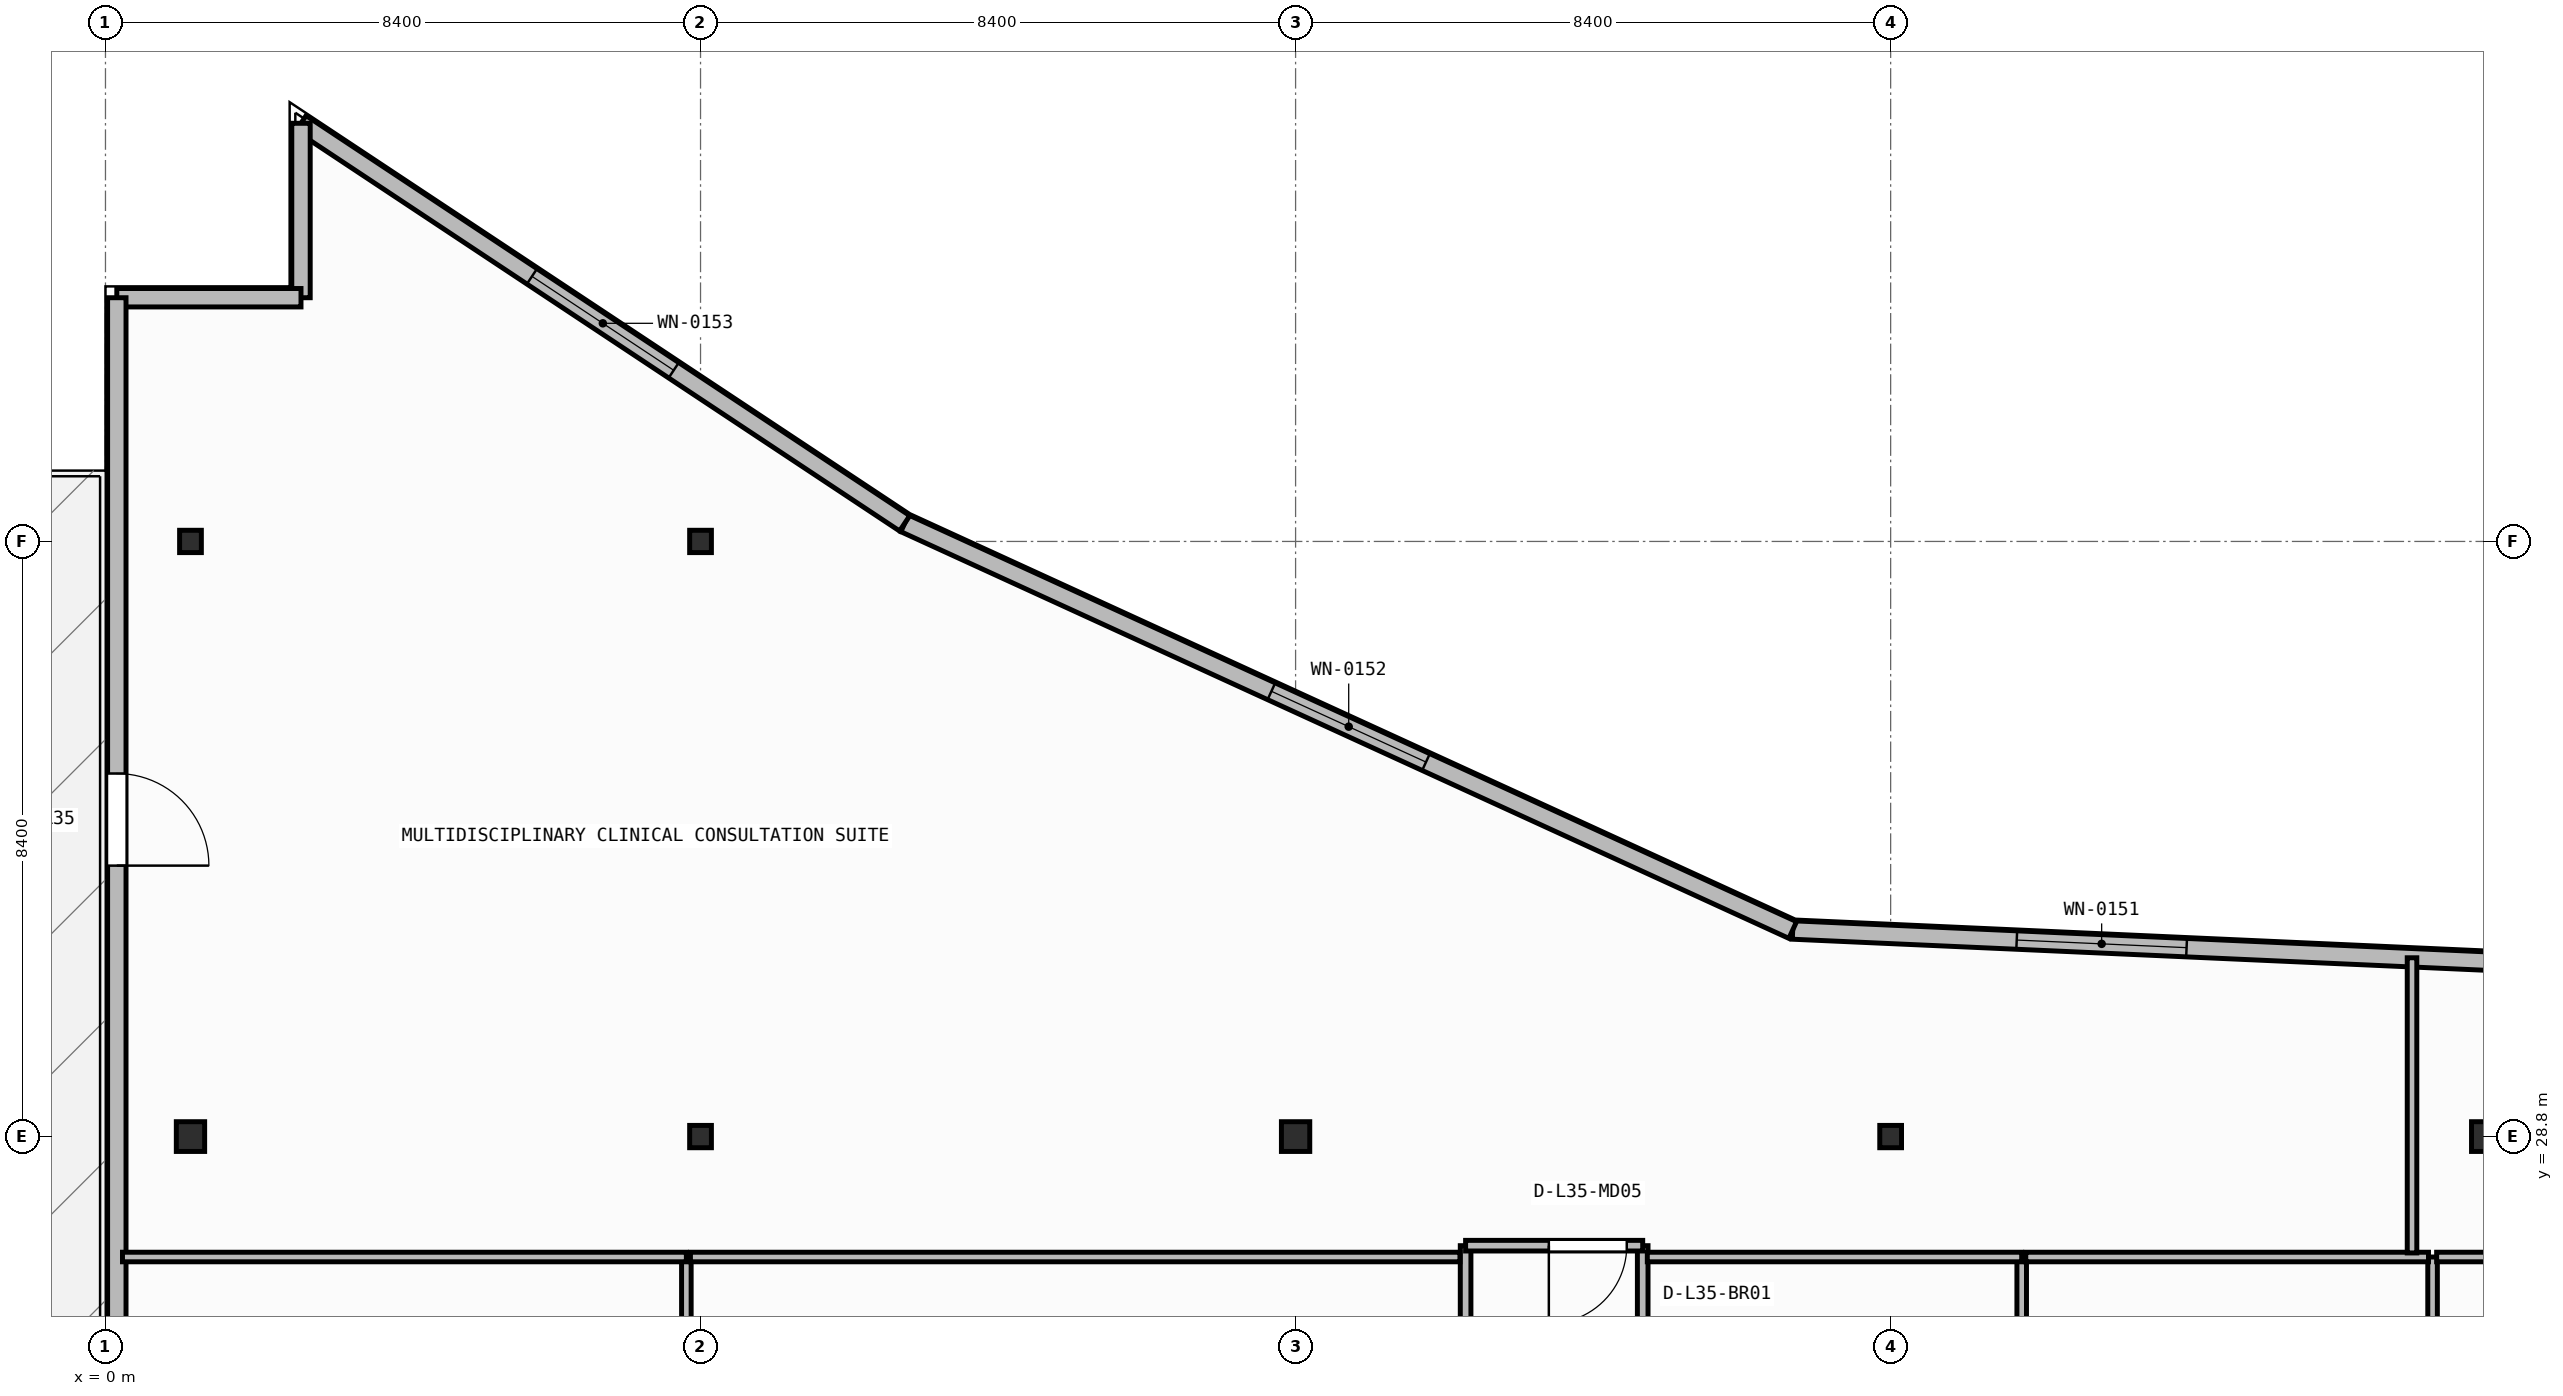
"""IFC4 building model, lengths in metres.
Left out: names, types, materials, properties, quantities, classifications, styles, units other than length and angle.
Written with IfcOpenShell. Run it as: python <this file> out.ifc"""

import sys

from ifc_helpers import new_model, si_unit, direction, frame, frame_2d, origin, origin_2d, place, context, subcontext, project, spatial, rectangle, i_section, extrude, element, fill, save


model = new_model("IFC4")
c1 = context("Model", 3, precision=1e-05, world=origin(), true_north=direction((0.0, 1.0)))
c2 = subcontext(c1, "Body", "Model", "MODEL_VIEW")
j1 = project(units=[si_unit("LENGTHUNIT", "METRE"), si_unit("PLANEANGLEUNIT", "RADIAN")], contexts=[c1])
p1 = place(None, origin())
s1 = spatial("IfcSite", under=j1, at=p1, CompositionType="ELEMENT")
p2 = place(p1, origin())
s2 = spatial("IfcBuilding", under=s1, at=p2, CompositionType="ELEMENT")
p3 = place(p2, frame((0.0, 0.0, 142.85)))
s3 = spatial("IfcBuildingStorey", under=s2, at=p3, CompositionType="ELEMENT", Elevation=142.85)
p4 = place(p3, frame((1.2, 28.8, 0.0), z_axis=(0.0, 0.0, 1.0), x_axis=(1.0, 0.0, 0.0)))
e1 = element("IfcColumn", 1, at=p4, inside=s3, PredefinedType="COLUMN", context=c2, shape_type="SweptSolid", body=[
    extrude(i_section(OverallWidth=0.4, OverallDepth=0.42, WebThickness=0.025, FlangeThickness=0.04, at=origin_2d()), origin(), (0.0, 0.0, 1.0), 3.95),
])
p5 = place(p3, frame((8.4, 28.8, 0.0), z_axis=(0.0, 0.0, 1.0), x_axis=(1.0, 0.0, 0.0)))
e2 = element("IfcColumn", 2, at=p5, inside=s3, PredefinedType="COLUMN", context=c2, shape_type="SweptSolid", body=[
    extrude(i_section(OverallWidth=0.307, OverallDepth=0.315, WebThickness=0.012, FlangeThickness=0.019, FilletRadius=0.017, at=origin_2d()), origin(), (0.0, 0.0, 1.0), 3.95),
])
p6 = place(p3, frame((16.8, 28.8, 0.0), z_axis=(0.0, 0.0, 1.0), x_axis=(1.0, 0.0, 0.0)))
e3 = element("IfcColumn", 3, at=p6, inside=s3, PredefinedType="COLUMN", context=c2, shape_type="SweptSolid", body=[
    extrude(i_section(OverallWidth=0.4, OverallDepth=0.42, WebThickness=0.025, FlangeThickness=0.04, at=origin_2d()), origin(), (0.0, 0.0, 1.0), 3.95),
])
p7 = place(p3, frame((25.2, 28.8, 0.0), z_axis=(0.0, 0.0, 1.0), x_axis=(1.0, 0.0, 0.0)))
e4 = element("IfcColumn", 4, at=p7, inside=s3, PredefinedType="COLUMN", context=c2, shape_type="SweptSolid", body=[
    extrude(i_section(OverallWidth=0.307, OverallDepth=0.315, WebThickness=0.012, FlangeThickness=0.019, FilletRadius=0.017, at=origin_2d()), origin(), (0.0, 0.0, 1.0), 3.95),
])
p8 = place(p3, frame((33.6, 28.8, 0.0), z_axis=(0.0, 0.0, 1.0), x_axis=(1.0, 0.0, 0.0)))
e5 = element("IfcColumn", 5, at=p8, inside=s3, PredefinedType="COLUMN", context=c2, shape_type="SweptSolid", body=[
    extrude(i_section(OverallWidth=0.4, OverallDepth=0.42, WebThickness=0.025, FlangeThickness=0.04, at=origin_2d()), origin(), (0.0, 0.0, 1.0), 3.95),
])
for number, where, z_axis, x_axis in (
    (6, (1.2, 37.2, 0.0), (0.0, 0.0, 1.0), (1.0, 0.0, 0.0)),
    (7, (8.4, 37.2, 0.0), (0.0, 0.0, 1.0), (1.0, 0.0, 0.0)),
):
    element("IfcColumn", number, at=place(p3, frame(where, z_axis=z_axis, x_axis=x_axis)), inside=s3, PredefinedType="COLUMN", context=c2, shape_type="SweptSolid", body=[
        extrude(i_section(OverallWidth=0.307, OverallDepth=0.315, WebThickness=0.012, FlangeThickness=0.019, FilletRadius=0.017, at=origin_2d()), origin(), (0.0, 0.0, 1.0), 3.95),
    ])
p9 = place(p3, frame((38.63, 31.052, 0.0), z_axis=(0.0, 0.0, 1.0), x_axis=(-0.998996592956, 0.044786239663, 0.0)))
e8 = element("IfcWall", 8, at=p9, inside=s3, PredefinedType="STANDARD", context=c2, shape_type="SweptSolid", body=[
    extrude(rectangle(XDim=14.827, YDim=0.26, at=frame_2d((7.414, 0.0))), origin(), (0.0, 0.0, 1.0), 3.71),
])
p10 = place(p9, frame((9.262, 0.0, 0.9)))
e9 = element("IfcOpeningElement", 9, at=p10, cuts=e8, PredefinedType="OPENING", context=c2, shape_type="SweptSolid", body=[
    extrude(rectangle(XDim=2.4, YDim=1.65, at=frame_2d((1.2, 0.825))), frame((0.0, 0.14, 0.0), z_axis=(0.0, -1.0, 0.0), x_axis=(1.0, 0.0, 0.0)), (0.0, 0.0, 1.0), 0.28),
])
p11 = place(p3, frame((23.818, 31.716, 0.0), z_axis=(0.0, 0.0, 1.0), x_axis=(-0.909209527513, 0.416338846471, 0.0)))
e10 = element("IfcWall", 10, at=p11, inside=s3, PredefinedType="STANDARD", context=c2, shape_type="SweptSolid", body=[
    extrude(rectangle(XDim=13.787, YDim=0.26, at=frame_2d((6.894, 0.0))), origin(), (0.0, 0.0, 1.0), 3.71),
])
p12 = place(p11, frame((5.694, 0.0, 0.9)))
e11 = element("IfcOpeningElement", 11, at=p12, cuts=e10, PredefinedType="OPENING", context=c2, shape_type="SweptSolid", body=[
    extrude(rectangle(XDim=2.4, YDim=1.65, at=frame_2d((1.2, 0.825))), frame((0.0, 0.14, 0.0), z_axis=(0.0, -1.0, 0.0), x_axis=(1.0, 0.0, 0.0)), (0.0, 0.0, 1.0), 0.28),
])
p13 = place(p3, frame((11.282, 37.456, 0.0), z_axis=(0.0, 0.0, 1.0), x_axis=(-0.833630474253, 0.552322580017, 0.0)))
e12 = element("IfcWall", 12, at=p13, inside=s3, PredefinedType="STANDARD", context=c2, shape_type="SweptSolid", body=[
    extrude(rectangle(XDim=10.223, YDim=0.26, at=frame_2d((5.111, 0.0))), origin(), (0.0, 0.0, 1.0), 3.71),
])
p14 = place(p13, frame((3.911, 0.0, 0.9)))
e13 = element("IfcOpeningElement", 13, at=p14, cuts=e12, PredefinedType="OPENING", context=c2, shape_type="SweptSolid", body=[
    extrude(rectangle(XDim=2.4, YDim=1.65, at=frame_2d((1.2, 0.825))), frame((0.0, 0.14, 0.0), z_axis=(0.0, -1.0, 0.0), x_axis=(1.0, 0.0, 0.0)), (0.0, 0.0, 1.0), 0.28),
])
p15 = place(p3, frame((2.76, 43.102, 0.0), z_axis=(0.0, 0.0, 1.0), x_axis=(0.0, -1.0, 0.0)))
e14 = element("IfcWall", 14, at=p15, inside=s3, PredefinedType="STANDARD", context=c2, shape_type="SweptSolid", body=[
    extrude(rectangle(XDim=2.462, YDim=0.26, at=frame_2d((1.231, 0.0))), origin(), (0.0, 0.0, 1.0), 3.71),
])
p16 = place(p3, frame((2.76, 40.64, 0.0), z_axis=(0.0, 0.0, 1.0), x_axis=(-1.0, 0.0, 0.0)))
e15 = element("IfcWall", 15, at=p16, inside=s3, PredefinedType="STANDARD", context=c2, shape_type="SweptSolid", body=[
    extrude(rectangle(XDim=2.6, YDim=0.26, at=frame_2d((1.3, 0.0))), origin(), (0.0, 0.0, 1.0), 3.71),
])
p17 = place(p3, frame((0.16, 40.64, 0.0), z_axis=(0.0, 0.0, 1.0), x_axis=(0.0, -1.0, 0.0)))
e16 = element("IfcWall", 16, at=p17, inside=s3, PredefinedType="STANDARD", context=c2, shape_type="SweptSolid", body=[
    extrude(rectangle(XDim=37.88, YDim=0.26, at=frame_2d((18.94, 0.0))), origin(), (0.0, 0.0, 1.0), 3.71),
])
p18 = place(p17, frame((6.716, 0.0, 0.0)))
e17 = element("IfcOpeningElement", 17, at=p18, cuts=e16, PredefinedType="OPENING", context=c2, shape_type="SweptSolid", body=[
    extrude(rectangle(XDim=1.3, YDim=2.15, at=frame_2d((0.65, 1.075))), frame((0.0, 0.14, 0.0), z_axis=(0.0, -1.0, 0.0), x_axis=(1.0, 0.0, 0.0)), (0.0, 0.0, 1.0), 0.28),
])
p19 = place(p3, frame((19.2, 27.26, 0.0), z_axis=(0.0, 0.0, 1.0), x_axis=(0.0, -1.0, 0.0)))
e18 = element("IfcWall", 18, at=p19, inside=s3, PredefinedType="PARTITIONING", context=c2, shape_type="SweptSolid", body=[
    extrude(rectangle(XDim=12.56, YDim=0.15, at=frame_2d((6.28, 0.0))), origin(), (0.0, 0.0, 1.0), 3.71),
])
p20 = place(p3, frame((21.7, 23.784, 0.0), z_axis=(0.0, 0.0, 1.0), x_axis=(0.0, 1.0, 0.0)))
e19 = element("IfcWall", 19, at=p20, inside=s3, PredefinedType="PARTITIONING", context=c2, shape_type="SweptSolid", body=[
    extrude(rectangle(XDim=3.476, YDim=0.15, at=frame_2d((1.738, 0.0))), origin(), (0.0, 0.0, 1.0), 3.71),
])
p21 = place(p20, frame((1.088, 0.0, 0.0)))
e20 = element("IfcOpeningElement", 20, at=p21, cuts=e19, PredefinedType="OPENING", context=c2, shape_type="SweptSolid", body=[
    extrude(rectangle(XDim=1.3, YDim=2.15, at=frame_2d((0.65, 1.075))), frame((0.0, 0.085, 0.0), z_axis=(0.0, -1.0, 0.0), x_axis=(1.0, 0.0, 0.0)), (0.0, 0.0, 1.0), 0.17),
])
p22 = place(p3, frame((21.7, 27.26, 0.0), z_axis=(0.0, 0.0, 1.0), x_axis=(-1.0, 0.0, 0.0)))
e21 = element("IfcWall", 21, at=p22, inside=s3, PredefinedType="PARTITIONING", context=c2, shape_type="SweptSolid", body=[
    extrude(rectangle(XDim=2.5, YDim=0.15, at=frame_2d((1.25, 0.0))), origin(), (0.0, 0.0, 1.0), 3.71),
])
p23 = place(p22, frame((0.225, 0.0, 0.0)))
e22 = element("IfcOpeningElement", 22, at=p23, cuts=e21, PredefinedType="OPENING", context=c2, shape_type="SweptSolid", body=[
    extrude(rectangle(XDim=1.1, YDim=2.1, at=frame_2d((0.55, 1.05))), frame((0.0, 0.085, 0.0), z_axis=(0.0, -1.0, 0.0), x_axis=(1.0, 0.0, 0.0)), (0.0, 0.0, 1.0), 0.17),
])
p24 = place(p3, frame((8.2, 14.76, 0.0), z_axis=(0.0, 0.0, 1.0), x_axis=(0.0, 1.0, 0.0)))
e23 = element("IfcWall", 23, at=p24, inside=s3, PredefinedType="PARTITIONING", context=c2, shape_type="SweptSolid", body=[
    extrude(rectangle(XDim=12.34, YDim=0.135, at=frame_2d((6.17, 0.0))), origin(), (0.0, 0.0, 1.0), 3.152),
])
p25 = place(p3, frame((8.2, 27.1, 0.0), z_axis=(0.0, 0.0, 1.0), x_axis=(-1.0, 0.0, 0.0)))
e24 = element("IfcWall", 24, at=p25, inside=s3, PredefinedType="PARTITIONING", context=c2, shape_type="SweptSolid", body=[
    extrude(rectangle(XDim=7.96, YDim=0.135, at=frame_2d((3.98, 0.0))), origin(), (0.0, 0.0, 1.0), 3.71),
])
p26 = place(p3, frame((19.12, 27.1, 0.0), z_axis=(0.0, 0.0, 1.0), x_axis=(-1.0, 0.0, 0.0)))
e25 = element("IfcWall", 25, at=p26, inside=s3, PredefinedType="PARTITIONING", context=c2, shape_type="SweptSolid", body=[
    extrude(rectangle(XDim=10.863, YDim=0.135, at=frame_2d((5.431, 0.0))), origin(), (0.0, 0.0, 1.0), 3.71),
])
p27 = place(p3, frame((27.05, 23.802, 0.0), z_axis=(0.0, 0.0, 1.0), x_axis=(0.0, 1.0, 0.0)))
e26 = element("IfcWall", 26, at=p27, inside=s3, PredefinedType="PARTITIONING", context=c2, shape_type="SweptSolid", body=[
    extrude(rectangle(XDim=3.298, YDim=0.135, at=frame_2d((1.649, 0.0))), origin(), (0.0, 0.0, 1.0), 3.71),
])
p28 = place(p3, frame((27.05, 27.1, 0.0), z_axis=(0.0, 0.0, 1.0), x_axis=(-1.0, 0.0, 0.0)))
e27 = element("IfcWall", 27, at=p28, inside=s3, PredefinedType="PARTITIONING", context=c2, shape_type="SweptSolid", body=[
    extrude(rectangle(XDim=5.285, YDim=0.135, at=frame_2d((2.643, 0.0))), origin(), (0.0, 0.0, 1.0), 3.71),
])
p29 = place(p3, frame((32.85, 20.715, 0.0), z_axis=(0.0, 0.0, 1.0), x_axis=(0.0, 1.0, 0.0)))
e28 = element("IfcWall", 28, at=p29, inside=s3, PredefinedType="PARTITIONING", context=c2, shape_type="SweptSolid", body=[
    extrude(rectangle(XDim=6.385, YDim=0.135, at=frame_2d((3.192, 0.0))), origin(), (0.0, 0.0, 1.0), 3.71),
])
p30 = place(p3, frame((32.792, 27.1, 0.0), z_axis=(0.0, 0.0, 1.0), x_axis=(-1.0, 0.0, 0.0)))
e29 = element("IfcWall", 29, at=p30, inside=s3, PredefinedType="PARTITIONING", context=c2, shape_type="SweptSolid", body=[
    extrude(rectangle(XDim=5.685, YDim=0.135, at=frame_2d((2.843, 0.0))), origin(), (0.0, 0.0, 1.0), 3.71),
])
p31 = place(p3, frame((39.11, 27.1, 0.0), z_axis=(0.0, 0.0, 1.0), x_axis=(-1.0, 0.0, 0.0)))
e30 = element("IfcWall", 30, at=p31, inside=s3, PredefinedType="PARTITIONING", context=c2, shape_type="SweptSolid", body=[
    extrude(rectangle(XDim=6.203, YDim=0.135, at=frame_2d((3.101, 0.0))), origin(), (0.0, 0.0, 1.0), 3.71),
])
p32 = place(p31, frame((0.318, 0.0, 0.0)))
e31 = element("IfcOpeningElement", 31, at=p32, cuts=e30, PredefinedType="OPENING", context=c2, shape_type="SweptSolid", body=[
    extrude(rectangle(XDim=1.1, YDim=2.1, at=frame_2d((0.55, 1.05))), frame((0.0, 0.077, 0.0), z_axis=(0.0, -1.0, 0.0), x_axis=(1.0, 0.0, 0.0)), (0.0, 0.0, 1.0), 0.155),
])
p33 = place(p3, frame((32.56, 27.157, 0.0), z_axis=(0.0, 0.0, 1.0), x_axis=(0.0, 1.0, 0.0)))
e32 = element("IfcWall", 32, at=p33, inside=s3, PredefinedType="PARTITIONING", context=c2, shape_type="SweptSolid", body=[
    extrude(rectangle(XDim=4.166, YDim=0.135, at=frame_2d((2.083, 0.0))), origin(), (0.0, 0.0, 1.0), 3.71),
])
p34 = place(p10, origin())
e33 = element("IfcWindow", 33, at=p34, inside=s3, PartitioningType="SINGLE_PANEL", PredefinedType="WINDOW", context=c2, shape_type="SweptSolid", body=[
    extrude(rectangle(XDim=2.4, YDim=1.65, at=frame_2d((1.2, 0.825))), frame((0.0, 0.03, 0.0), z_axis=(0.0, -1.0, 0.0), x_axis=(1.0, 0.0, 0.0)), (0.0, 0.0, 1.0), 0.06),
])
fill(e9, e33)
p35 = place(p12, origin())
e34 = element("IfcWindow", 34, at=p35, inside=s3, PartitioningType="SINGLE_PANEL", PredefinedType="WINDOW", context=c2, shape_type="SweptSolid", body=[
    extrude(rectangle(XDim=2.4, YDim=1.65, at=frame_2d((1.2, 0.825))), frame((0.0, 0.03, 0.0), z_axis=(0.0, -1.0, 0.0), x_axis=(1.0, 0.0, 0.0)), (0.0, 0.0, 1.0), 0.06),
])
fill(e11, e34)
p36 = place(p14, origin())
e35 = element("IfcWindow", 35, at=p36, inside=s3, PartitioningType="SINGLE_PANEL", PredefinedType="WINDOW", context=c2, shape_type="SweptSolid", body=[
    extrude(rectangle(XDim=2.4, YDim=1.65, at=frame_2d((1.2, 0.825))), frame((0.0, 0.03, 0.0), z_axis=(0.0, -1.0, 0.0), x_axis=(1.0, 0.0, 0.0)), (0.0, 0.0, 1.0), 0.06),
])
fill(e13, e35)
p37 = place(p18, origin())
e36 = element("IfcDoor", 36, at=p37, inside=s3, OperationType="SINGLE_SWING_RIGHT", PredefinedType="DOOR", context=c2, shape_type="SweptSolid", body=[
    extrude(rectangle(XDim=1.3, YDim=2.15, at=frame_2d((0.65, 1.075))), frame((0.0, 0.025, 0.0), z_axis=(0.0, -1.0, 0.0), x_axis=(1.0, 0.0, 0.0)), (0.0, 0.0, 1.0), 0.05),
])
fill(e17, e36)
p38 = place(p23, origin())
e37 = element("IfcDoor", 37, at=p38, inside=s3, OperationType="SINGLE_SWING_RIGHT", PredefinedType="DOOR", context=c2, shape_type="SweptSolid", body=[
    extrude(rectangle(XDim=1.1, YDim=2.1, at=frame_2d((0.55, 1.05))), frame((0.0, 0.025, 0.0), z_axis=(0.0, -1.0, 0.0), x_axis=(1.0, 0.0, 0.0)), (0.0, 0.0, 1.0), 0.05),
])
fill(e22, e37)
save(model, sys.argv[1])
